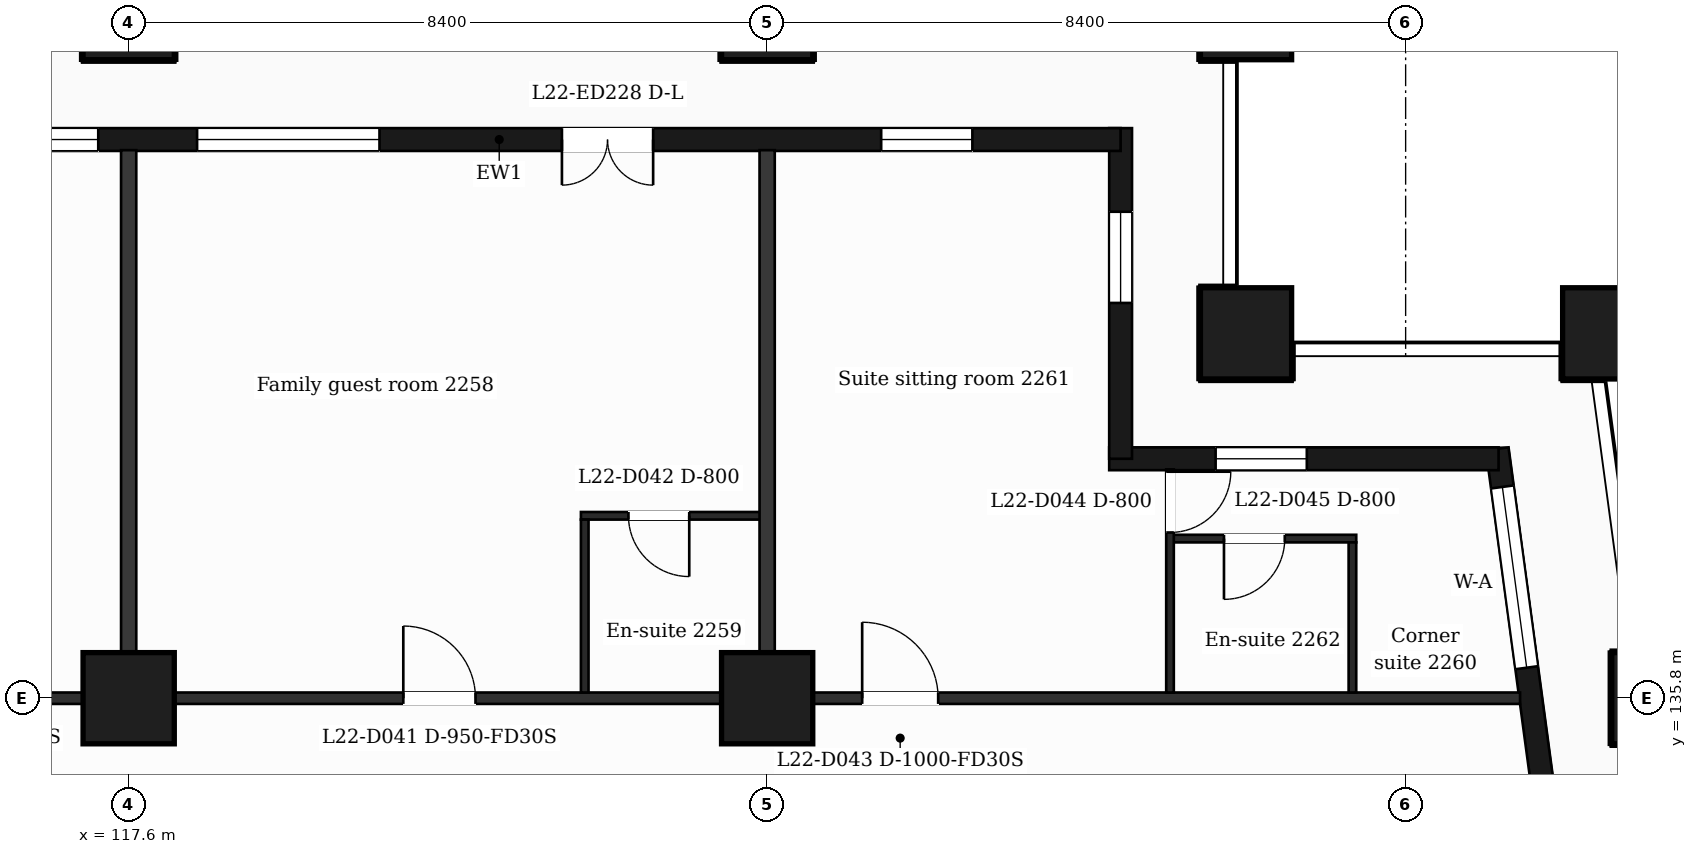
"""IFC4 building model, lengths in metres.
Left out: names, types, materials, properties, quantities, classifications, styles, units other than length and angle.
Written with IfcOpenShell. Run it as: python <this file> out.ifc"""

import sys

from ifc_helpers import new_model, si_unit, direction, frame, frame_2d, origin, origin_2d, place, context, subcontext, project, spatial, rectangle, extrude, element, fill, save


model = new_model("IFC4")
c1 = context("Model", 3, precision=1e-05, world=origin(), true_north=direction((0.0, 1.0)))
c2 = subcontext(c1, "Body", "Model", "MODEL_VIEW")
j1 = project(units=[si_unit("LENGTHUNIT", "METRE"), si_unit("PLANEANGLEUNIT", "RADIAN")], contexts=[c1])
p1 = place(None, origin())
s1 = spatial("IfcSite", under=j1, at=p1, CompositionType="ELEMENT")
p2 = place(p1, origin())
s2 = spatial("IfcBuilding", under=s1, at=p2, CompositionType="ELEMENT")
p3 = place(p2, frame((0.0, 0.0, 98.4)))
s3 = spatial("IfcBuildingStorey", under=s2, at=p3, CompositionType="ELEMENT", Elevation=98.4)
for number, where, z_axis, x_axis in (
    (1, (132.3, 140.6, 0.0), (0.0, 0.0, 1.0), (1.0, 0.0, 0.0)),
    (2, (137.065, 140.6, 0.0), (0.0, 0.0, 1.0), (1.0, 0.0, 0.0)),
    (3, (117.6, 135.8, 0.0), (0.0, 0.0, 1.0), (1.0, 0.0, 0.0)),
    (4, (126.0, 135.8, 0.0), (0.0, 0.0, 1.0), (1.0, 0.0, 0.0)),
    (5, (137.711, 135.8, 0.0), (0.0, 0.0, 1.0), (1.0, 0.0, 0.0)),
    (6, (117.6, 144.8, 0.0), (0.0, 0.0, 1.0), (1.0, 0.0, 0.0)),
    (7, (126.0, 144.8, 0.0), (0.0, 0.0, 1.0), (1.0, 0.0, 0.0)),
    (8, (132.3, 144.8, 0.0), (0.0, 0.0, 1.0), (1.0, 0.0, 0.0)),
):
    element("IfcColumn", number, at=place(p3, frame(where, z_axis=z_axis, x_axis=x_axis)), inside=s3, PredefinedType="COLUMN", context=c2, shape_type="SweptSolid", body=[
        extrude(rectangle(XDim=1.2, YDim=1.2, at=origin_2d()), origin(), (0.0, 0.0, 1.0), 3.7),
    ])
p4 = place(p3, frame((136.504, 132.4, 0.0), z_axis=(0.0, 0.0, 1.0), x_axis=(-0.133399697462, 0.99106231929, 0.0)))
e9 = element("IfcWall", 9, at=p4, inside=s3, PredefinedType="SOLIDWALL", context=c2, shape_type="SweptSolid", body=[
    extrude(rectangle(XDim=6.74, YDim=0.3, at=frame_2d((3.37, 0.0))), origin(), (0.0, 0.0, 1.0), 3.38),
])
p5 = place(p4, frame((1.115, 0.0, 0.0)))
e10 = element("IfcOpeningElement", 10, at=p5, cuts=e9, PredefinedType="OPENING", context=c2, shape_type="SweptSolid", body=[
    extrude(rectangle(XDim=1.2, YDim=2.4, at=frame_2d((0.6, 1.2))), frame((0.0, 0.16, 0.0), z_axis=(0.0, -1.0, 0.0), x_axis=(1.0, 0.0, 0.0)), (0.0, 0.0, 1.0), 0.32),
])
p6 = place(p4, frame((3.835, 0.0, 0.9)))
e11 = element("IfcOpeningElement", 11, at=p6, cuts=e9, PredefinedType="OPENING", context=c2, shape_type="SweptSolid", body=[
    extrude(rectangle(XDim=2.4, YDim=2.1, at=frame_2d((1.2, 1.05))), frame((0.0, 0.16, 0.0), z_axis=(0.0, -1.0, 0.0), x_axis=(1.0, 0.0, 0.0)), (0.0, 0.0, 1.0), 0.32),
])
p7 = place(p3, frame((135.623, 138.95, 0.0), z_axis=(0.0, 0.0, 1.0), x_axis=(-1.0, 0.0, 0.0)))
e12 = element("IfcWall", 12, at=p7, inside=s3, PredefinedType="SOLIDWALL", context=c2, shape_type="SweptSolid", body=[
    extrude(rectangle(XDim=5.123, YDim=0.3, at=frame_2d((2.561, 0.0))), origin(), (0.0, 0.0, 1.0), 3.38),
])
p8 = place(p7, frame((2.523, 0.0, 0.9)))
e13 = element("IfcOpeningElement", 13, at=p8, cuts=e12, PredefinedType="OPENING", context=c2, shape_type="SweptSolid", body=[
    extrude(rectangle(XDim=1.2, YDim=2.1, at=frame_2d((0.6, 1.05))), frame((0.0, 0.16, 0.0), z_axis=(0.0, -1.0, 0.0), x_axis=(1.0, 0.0, 0.0)), (0.0, 0.0, 1.0), 0.32),
])
p9 = place(p3, frame((130.65, 138.95, 0.0), z_axis=(0.0, 0.0, 1.0), x_axis=(0.0, 1.0, 0.0)))
e14 = element("IfcWall", 14, at=p9, inside=s3, PredefinedType="SOLIDWALL", context=c2, shape_type="SweptSolid", body=[
    extrude(rectangle(XDim=4.35, YDim=0.3, at=frame_2d((2.175, 0.0))), origin(), (0.0, 0.0, 1.0), 3.38),
])
p10 = place(p9, frame((2.05, 0.0, 0.9)))
e15 = element("IfcOpeningElement", 15, at=p10, cuts=e14, PredefinedType="OPENING", context=c2, shape_type="SweptSolid", body=[
    extrude(rectangle(XDim=1.2, YDim=2.1, at=frame_2d((0.6, 1.05))), frame((0.0, 0.16, 0.0), z_axis=(0.0, -1.0, 0.0), x_axis=(1.0, 0.0, 0.0)), (0.0, 0.0, 1.0), 0.32),
])
p11 = place(p3, frame((130.65, 143.15, 0.0), z_axis=(0.0, 0.0, 1.0), x_axis=(-1.0, 0.0, 0.0)))
e16 = element("IfcWall", 16, at=p11, inside=s3, PredefinedType="SOLIDWALL", context=c2, shape_type="SweptSolid", body=[
    extrude(rectangle(XDim=16.35, YDim=0.3, at=frame_2d((8.175, 0.0))), origin(), (0.0, 0.0, 1.0), 3.38),
])
p12 = place(p11, frame((1.95, 0.0, 0.9)))
e17 = element("IfcOpeningElement", 17, at=p12, cuts=e16, PredefinedType="OPENING", context=c2, shape_type="SweptSolid", body=[
    extrude(rectangle(XDim=1.2, YDim=2.1, at=frame_2d((0.6, 1.05))), frame((0.0, 0.16, 0.0), z_axis=(0.0, -1.0, 0.0), x_axis=(1.0, 0.0, 0.0)), (0.0, 0.0, 1.0), 0.32),
])
p13 = place(p11, frame((6.15, 0.0, 0.0)))
e18 = element("IfcOpeningElement", 18, at=p13, cuts=e16, PredefinedType="OPENING", context=c2, shape_type="SweptSolid", body=[
    extrude(rectangle(XDim=1.2, YDim=2.4, at=frame_2d((0.6, 1.2))), frame((0.0, 0.16, 0.0), z_axis=(0.0, -1.0, 0.0), x_axis=(1.0, 0.0, 0.0)), (0.0, 0.0, 1.0), 0.32),
])
p14 = place(p11, frame((9.75, 0.0, 0.9)))
e19 = element("IfcOpeningElement", 19, at=p14, cuts=e16, PredefinedType="OPENING", context=c2, shape_type="SweptSolid", body=[
    extrude(rectangle(XDim=2.4, YDim=2.1, at=frame_2d((1.2, 1.05))), frame((0.0, 0.16, 0.0), z_axis=(0.0, -1.0, 0.0), x_axis=(1.0, 0.0, 0.0)), (0.0, 0.0, 1.0), 0.32),
])
p15 = place(p11, frame((13.45, 0.0, 0.9)))
e20 = element("IfcOpeningElement", 20, at=p15, cuts=e16, PredefinedType="OPENING", context=c2, shape_type="SweptSolid", body=[
    extrude(rectangle(XDim=2.4, YDim=2.1, at=frame_2d((1.2, 1.05))), frame((0.0, 0.16, 0.0), z_axis=(0.0, -1.0, 0.0), x_axis=(1.0, 0.0, 0.0)), (0.0, 0.0, 1.0), 0.32),
])
p16 = place(p3, frame((90.895, 135.8, 0.0), z_axis=(0.0, 0.0, 1.0), x_axis=(1.0, 0.0, 0.0)))
e21 = element("IfcWall", 21, at=p16, inside=s3, PredefinedType="PARTITIONING", context=c2, shape_type="SweptSolid", body=[
    extrude(rectangle(XDim=45.011, YDim=0.15, at=frame_2d((22.505, 0.0))), origin(), (0.0, 0.0, 1.0), 3.38),
])
p17 = place(p16, frame((7.455, 0.0, 0.0)))
e22 = element("IfcOpeningElement", 22, at=p17, cuts=e21, PredefinedType="OPENING", context=c2, shape_type="SweptSolid", body=[
    extrude(rectangle(XDim=1.0, YDim=2.1, at=frame_2d((0.5, 1.05))), frame((0.0, 0.085, 0.0), z_axis=(0.0, -1.0, 0.0), x_axis=(1.0, 0.0, 0.0)), (0.0, 0.0, 1.0), 0.17),
])
p18 = place(p16, frame((10.892, 0.0, 0.0)))
e23 = element("IfcOpeningElement", 23, at=p18, cuts=e21, PredefinedType="OPENING", context=c2, shape_type="SweptSolid", body=[
    extrude(rectangle(XDim=0.95, YDim=2.1, at=frame_2d((0.475, 1.05))), frame((0.0, 0.085, 0.0), z_axis=(0.0, -1.0, 0.0), x_axis=(1.0, 0.0, 0.0)), (0.0, 0.0, 1.0), 0.17),
])
p19 = place(p16, frame((23.68, 0.0, 0.0)))
e24 = element("IfcOpeningElement", 24, at=p19, cuts=e21, PredefinedType="OPENING", context=c2, shape_type="SweptSolid", body=[
    extrude(rectangle(XDim=1.0, YDim=2.1, at=frame_2d((0.5, 1.05))), frame((0.0, 0.085, 0.0), z_axis=(0.0, -1.0, 0.0), x_axis=(1.0, 0.0, 0.0)), (0.0, 0.0, 1.0), 0.17),
])
p20 = place(p16, frame((30.318, 0.0, 0.0)))
e25 = element("IfcOpeningElement", 25, at=p20, cuts=e21, PredefinedType="OPENING", context=c2, shape_type="SweptSolid", body=[
    extrude(rectangle(XDim=0.95, YDim=2.1, at=frame_2d((0.475, 1.05))), frame((0.0, 0.085, 0.0), z_axis=(0.0, -1.0, 0.0), x_axis=(1.0, 0.0, 0.0)), (0.0, 0.0, 1.0), 0.17),
])
p21 = place(p16, frame((36.355, 0.0, 0.0)))
e26 = element("IfcOpeningElement", 26, at=p21, cuts=e21, PredefinedType="OPENING", context=c2, shape_type="SweptSolid", body=[
    extrude(rectangle(XDim=1.0, YDim=2.1, at=frame_2d((0.5, 1.05))), frame((0.0, 0.085, 0.0), z_axis=(0.0, -1.0, 0.0), x_axis=(1.0, 0.0, 0.0)), (0.0, 0.0, 1.0), 0.17),
])
p22 = place(p3, frame((131.3, 137.9, 0.0), z_axis=(0.0, 0.0, 1.0), x_axis=(1.0, 0.0, 0.0)))
e27 = element("IfcWall", 27, at=p22, inside=s3, PredefinedType="PARTITIONING", context=c2, shape_type="SweptSolid", body=[
    extrude(rectangle(XDim=2.45, YDim=0.1, at=frame_2d((1.225, 0.0))), origin(), (0.0, 0.0, 1.0), 3.38),
])
p23 = place(p22, frame((0.71, 0.0, 0.0)))
e28 = element("IfcOpeningElement", 28, at=p23, cuts=e27, PredefinedType="OPENING", context=c2, shape_type="SweptSolid", body=[
    extrude(rectangle(XDim=0.8, YDim=2.1, at=frame_2d((0.4, 1.05))), frame((0.0, 0.06, 0.0), z_axis=(0.0, -1.0, 0.0), x_axis=(1.0, 0.0, 0.0)), (0.0, 0.0, 1.0), 0.12),
])
p24 = place(p3, frame((123.55, 138.2, 0.0), z_axis=(0.0, 0.0, 1.0), x_axis=(1.0, 0.0, 0.0)))
e29 = element("IfcWall", 29, at=p24, inside=s3, PredefinedType="PARTITIONING", context=c2, shape_type="SweptSolid", body=[
    extrude(rectangle(XDim=2.45, YDim=0.1, at=frame_2d((1.225, 0.0))), origin(), (0.0, 0.0, 1.0), 3.38),
])
p25 = place(p24, frame((0.625, 0.0, 0.0)))
e30 = element("IfcOpeningElement", 30, at=p25, cuts=e29, PredefinedType="OPENING", context=c2, shape_type="SweptSolid", body=[
    extrude(rectangle(XDim=0.8, YDim=2.1, at=frame_2d((0.4, 1.05))), frame((0.0, 0.06, 0.0), z_axis=(0.0, -1.0, 0.0), x_axis=(1.0, 0.0, 0.0)), (0.0, 0.0, 1.0), 0.12),
])
p26 = place(p3, frame((117.6, 135.875, 0.0), z_axis=(0.0, 0.0, 1.0), x_axis=(0.0, 1.0, 0.0)))
e31 = element("IfcWall", 31, at=p26, inside=s3, PredefinedType="PARTITIONING", context=c2, shape_type="SweptSolid", body=[
    extrude(rectangle(XDim=7.135, YDim=0.2, at=frame_2d((3.567, 0.0))), origin(), (0.0, 0.0, 1.0), 3.38),
])
p27 = place(p3, frame((123.6, 135.875, 0.0), z_axis=(0.0, 0.0, 1.0), x_axis=(0.0, 1.0, 0.0)))
e32 = element("IfcWall", 32, at=p27, inside=s3, PredefinedType="PARTITIONING", context=c2, shape_type="SweptSolid", body=[
    extrude(rectangle(XDim=2.275, YDim=0.1, at=frame_2d((1.137, 0.0))), origin(), (0.0, 0.0, 1.0), 3.38),
])
p28 = place(p3, frame((126.0, 135.875, 0.0), z_axis=(0.0, 0.0, 1.0), x_axis=(0.0, 1.0, 0.0)))
e33 = element("IfcWall", 33, at=p28, inside=s3, PredefinedType="PARTITIONING", context=c2, shape_type="SweptSolid", body=[
    extrude(rectangle(XDim=7.135, YDim=0.2, at=frame_2d((3.567, 0.0))), origin(), (0.0, 0.0, 1.0), 3.38),
])
p29 = place(p3, frame((131.3, 135.875, 0.0), z_axis=(0.0, 0.0, 1.0), x_axis=(0.0, 1.0, 0.0)))
e34 = element("IfcWall", 34, at=p29, inside=s3, PredefinedType="PARTITIONING", context=c2, shape_type="SweptSolid", body=[
    extrude(rectangle(XDim=2.935, YDim=0.1, at=frame_2d((1.468, 0.0))), origin(), (0.0, 0.0, 1.0), 3.38),
])
p30 = place(p29, frame((2.105, 0.0, 0.0)))
e35 = element("IfcOpeningElement", 35, at=p30, cuts=e34, PredefinedType="OPENING", context=c2, shape_type="SweptSolid", body=[
    extrude(rectangle(XDim=0.8, YDim=2.1, at=frame_2d((0.4, 1.05))), frame((0.0, 0.06, 0.0), z_axis=(0.0, -1.0, 0.0), x_axis=(1.0, 0.0, 0.0)), (0.0, 0.0, 1.0), 0.12),
])
p31 = place(p3, frame((133.7, 135.875, 0.0), z_axis=(0.0, 0.0, 1.0), x_axis=(0.0, 1.0, 0.0)))
e36 = element("IfcWall", 36, at=p31, inside=s3, PredefinedType="PARTITIONING", context=c2, shape_type="SweptSolid", body=[
    extrude(rectangle(XDim=1.975, YDim=0.1, at=frame_2d((0.988, 0.0))), origin(), (0.0, 0.0, 1.0), 3.38),
])
p32 = place(p6, origin())
e37 = element("IfcWindow", 37, at=p32, inside=s3, PartitioningType="SINGLE_PANEL", PredefinedType="WINDOW", context=c2, shape_type="SweptSolid", body=[
    extrude(rectangle(XDim=2.4, YDim=2.1, at=frame_2d((1.2, 1.05))), frame((0.0, 0.03, 0.0), z_axis=(0.0, -1.0, 0.0), x_axis=(1.0, 0.0, 0.0)), (0.0, 0.0, 1.0), 0.06),
])
fill(e11, e37)
p33 = place(p8, origin())
e38 = element("IfcWindow", 38, at=p33, inside=s3, PartitioningType="SINGLE_PANEL", PredefinedType="WINDOW", context=c2, shape_type="SweptSolid", body=[
    extrude(rectangle(XDim=1.2, YDim=2.1, at=frame_2d((0.6, 1.05))), frame((0.0, 0.03, 0.0), z_axis=(0.0, -1.0, 0.0), x_axis=(1.0, 0.0, 0.0)), (0.0, 0.0, 1.0), 0.06),
])
fill(e13, e38)
p34 = place(p10, origin())
e39 = element("IfcWindow", 39, at=p34, inside=s3, PartitioningType="SINGLE_PANEL", PredefinedType="WINDOW", context=c2, shape_type="SweptSolid", body=[
    extrude(rectangle(XDim=1.2, YDim=2.1, at=frame_2d((0.6, 1.05))), frame((0.0, 0.03, 0.0), z_axis=(0.0, -1.0, 0.0), x_axis=(1.0, 0.0, 0.0)), (0.0, 0.0, 1.0), 0.06),
])
fill(e15, e39)
p35 = place(p12, origin())
e40 = element("IfcWindow", 40, at=p35, inside=s3, PartitioningType="SINGLE_PANEL", PredefinedType="WINDOW", context=c2, shape_type="SweptSolid", body=[
    extrude(rectangle(XDim=1.2, YDim=2.1, at=frame_2d((0.6, 1.05))), frame((0.0, 0.03, 0.0), z_axis=(0.0, -1.0, 0.0), x_axis=(1.0, 0.0, 0.0)), (0.0, 0.0, 1.0), 0.06),
])
fill(e17, e40)
p36 = place(p13, origin())
e41 = element("IfcDoor", 41, at=p36, inside=s3, OperationType="DOUBLE_DOOR_SINGLE_SWING", PredefinedType="DOOR", context=c2, shape_type="SweptSolid", body=[
    extrude(rectangle(XDim=1.2, YDim=2.4, at=frame_2d((0.6, 1.2))), frame((0.0, 0.025, 0.0), z_axis=(0.0, -1.0, 0.0), x_axis=(1.0, 0.0, 0.0)), (0.0, 0.0, 1.0), 0.05),
])
fill(e18, e41)
p37 = place(p14, origin())
e42 = element("IfcWindow", 42, at=p37, inside=s3, PartitioningType="SINGLE_PANEL", PredefinedType="WINDOW", context=c2, shape_type="SweptSolid", body=[
    extrude(rectangle(XDim=2.4, YDim=2.1, at=frame_2d((1.2, 1.05))), frame((0.0, 0.03, 0.0), z_axis=(0.0, -1.0, 0.0), x_axis=(1.0, 0.0, 0.0)), (0.0, 0.0, 1.0), 0.06),
])
fill(e19, e42)
p38 = place(p15, origin())
e43 = element("IfcWindow", 43, at=p38, inside=s3, PartitioningType="SINGLE_PANEL", PredefinedType="WINDOW", context=c2, shape_type="SweptSolid", body=[
    extrude(rectangle(XDim=2.4, YDim=2.1, at=frame_2d((1.2, 1.05))), frame((0.0, 0.03, 0.0), z_axis=(0.0, -1.0, 0.0), x_axis=(1.0, 0.0, 0.0)), (0.0, 0.0, 1.0), 0.06),
])
fill(e20, e43)
p39 = place(p20, origin())
e44 = element("IfcDoor", 44, at=p39, inside=s3, OperationType="SINGLE_SWING_LEFT", PredefinedType="DOOR", context=c2, shape_type="SweptSolid", body=[
    extrude(rectangle(XDim=0.95, YDim=2.1, at=frame_2d((0.475, 1.05))), frame((0.0, 0.025, 0.0), z_axis=(0.0, -1.0, 0.0), x_axis=(1.0, 0.0, 0.0)), (0.0, 0.0, 1.0), 0.05),
])
fill(e25, e44)
p40 = place(p25, origin())
e45 = element("IfcDoor", 45, at=p40, inside=s3, OperationType="SINGLE_SWING_RIGHT", PredefinedType="DOOR", context=c2, shape_type="SweptSolid", body=[
    extrude(rectangle(XDim=0.8, YDim=2.1, at=frame_2d((0.4, 1.05))), frame((0.0, 0.025, 0.0), z_axis=(0.0, -1.0, 0.0), x_axis=(1.0, 0.0, 0.0)), (0.0, 0.0, 1.0), 0.05),
])
fill(e30, e45)
p41 = place(p21, origin())
e46 = element("IfcDoor", 46, at=p41, inside=s3, OperationType="SINGLE_SWING_LEFT", PredefinedType="DOOR", context=c2, shape_type="SweptSolid", body=[
    extrude(rectangle(XDim=1.0, YDim=2.1, at=frame_2d((0.5, 1.05))), frame((0.0, 0.025, 0.0), z_axis=(0.0, -1.0, 0.0), x_axis=(1.0, 0.0, 0.0)), (0.0, 0.0, 1.0), 0.05),
])
fill(e26, e46)
p42 = place(p30, origin())
e47 = element("IfcDoor", 47, at=p42, inside=s3, OperationType="SINGLE_SWING_RIGHT", PredefinedType="DOOR", context=c2, shape_type="SweptSolid", body=[
    extrude(rectangle(XDim=0.8, YDim=2.1, at=frame_2d((0.4, 1.05))), frame((0.0, 0.025, 0.0), z_axis=(0.0, -1.0, 0.0), x_axis=(1.0, 0.0, 0.0)), (0.0, 0.0, 1.0), 0.05),
])
fill(e35, e47)
p43 = place(p23, origin())
e48 = element("IfcDoor", 48, at=p43, inside=s3, OperationType="SINGLE_SWING_LEFT", PredefinedType="DOOR", context=c2, shape_type="SweptSolid", body=[
    extrude(rectangle(XDim=0.8, YDim=2.1, at=frame_2d((0.4, 1.05))), frame((0.0, 0.025, 0.0), z_axis=(0.0, -1.0, 0.0), x_axis=(1.0, 0.0, 0.0)), (0.0, 0.0, 1.0), 0.05),
])
fill(e28, e48)
save(model, sys.argv[1])
